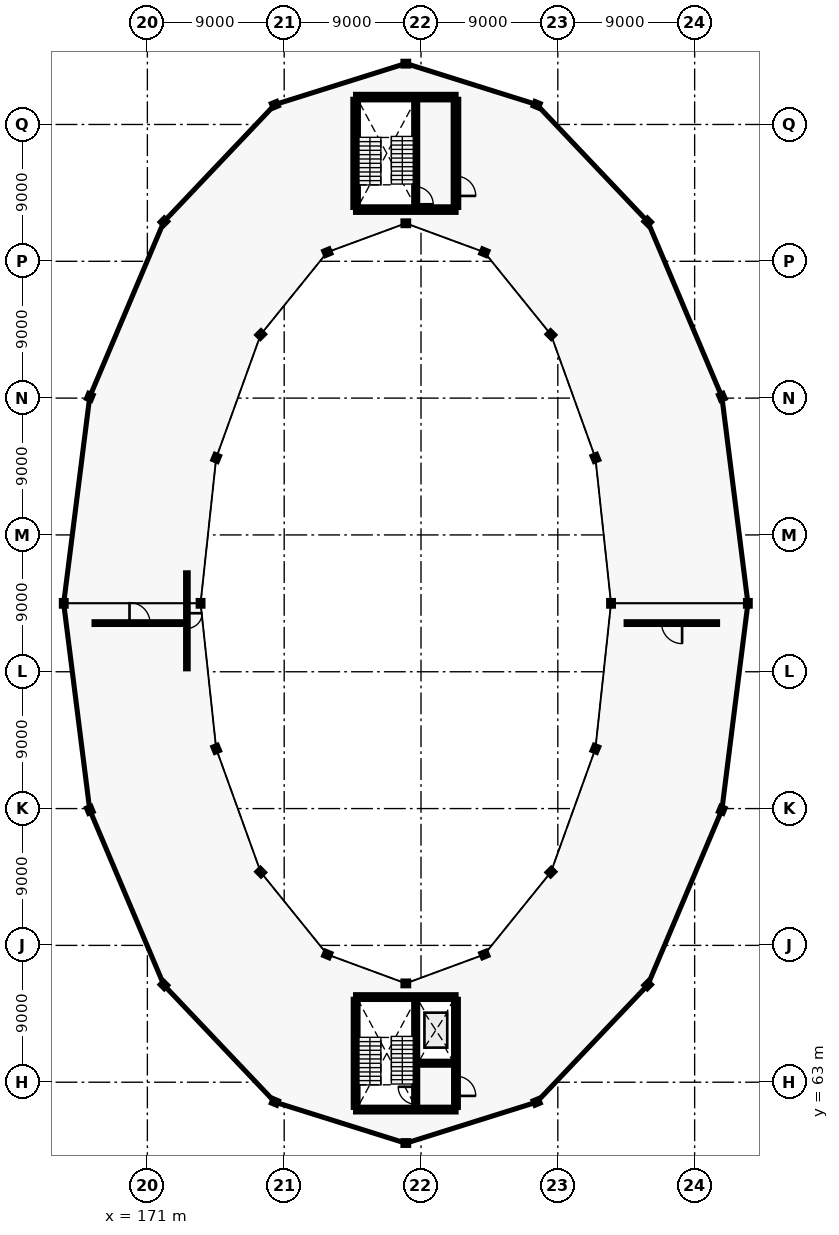
"""IFC4 building model, lengths in metres.
Left out: names, types, materials, properties, quantities, classifications, styles, units other than length and angle.
Written with IfcOpenShell. Run it as: python <this file> out.ifc"""

import sys

from ifc_helpers import new_model, si_unit, direction, frame, frame_2d, origin, origin_2d, place, context, subcontext, project, spatial, rectangle, i_section, extrude, element, fill, save


model = new_model("IFC4")
c1 = context("Model", 3, precision=1e-05, world=origin(), true_north=direction((0.0, 1.0)))
c2 = subcontext(c1, "Body", "Model", "MODEL_VIEW")
j1 = project(units=[si_unit("LENGTHUNIT", "METRE"), si_unit("PLANEANGLEUNIT", "RADIAN")], contexts=[c1])
p1 = place(None, origin())
s1 = spatial("IfcSite", under=j1, at=p1, CompositionType="ELEMENT")
p2 = place(p1, origin())
s2 = spatial("IfcBuilding", under=s1, at=p2, CompositionType="ELEMENT")
p3 = place(p2, frame((0.0, 0.0, 5.4)))
s3 = spatial("IfcBuildingStorey", under=s2, at=p3, CompositionType="ELEMENT", Elevation=5.4)
for number, where, z_axis, x_axis in (
    (1, (201.5, 94.5, 0.0), (0.0, 0.0, 1.0), (1.0, 0.0, 0.0)),
    (2, (210.5, 94.5, 0.0), (0.0, 0.0, 1.0), (1.0, 0.0, 0.0)),
    (3, (200.472, 104.067, 0.0), (0.0, 0.0, 1.0), (0.924, 0.383, 0.0)),
    (4, (208.787, 108.085, 0.0), (0.0, 0.0, 1.0), (0.924, 0.383, 0.0)),
    (5, (197.546, 112.178, 0.0), (0.0, 0.0, 1.0), (0.707, 0.707, 0.0)),
    (6, (203.91, 119.602, 0.0), (0.0, 0.0, 1.0), (0.707, 0.707, 0.0)),
    (7, (193.166, 117.597, 0.0), (0.0, 0.0, 1.0), (0.383, 0.924, 0.0)),
    (8, (196.61, 127.298, 0.0), (0.0, 0.0, 1.0), (0.383, 0.924, 0.0)),
    (9, (188.0, 119.5, 0.0), (0.0, 0.0, 1.0), (0.0, 1.0, 0.0)),
    (10, (188.0, 130.0, 0.0), (0.0, 0.0, 1.0), (0.0, 1.0, 0.0)),
    (11, (182.834, 117.597, 0.0), (0.0, 0.0, 1.0), (-0.383, 0.924, 0.0)),
    (12, (179.39, 127.298, 0.0), (0.0, 0.0, 1.0), (-0.383, 0.924, 0.0)),
    (13, (178.454, 112.178, 0.0), (0.0, 0.0, 1.0), (-0.707, 0.707, 0.0)),
    (14, (172.09, 119.602, 0.0), (0.0, 0.0, 1.0), (-0.707, 0.707, 0.0)),
    (15, (175.528, 104.067, 0.0), (0.0, 0.0, 1.0), (-0.924, 0.383, 0.0)),
    (16, (167.213, 108.085, 0.0), (0.0, 0.0, 1.0), (-0.924, 0.383, 0.0)),
    (17, (174.5, 94.5, 0.0), (0.0, 0.0, 1.0), (-1.0, 0.0, 0.0)),
    (18, (165.5, 94.5, 0.0), (0.0, 0.0, 1.0), (-1.0, 0.0, 0.0)),
    (19, (175.528, 84.933, 0.0), (0.0, 0.0, 1.0), (-0.924, -0.383, 0.0)),
    (20, (167.213, 80.915, 0.0), (0.0, 0.0, 1.0), (-0.924, -0.383, 0.0)),
    (21, (178.454, 76.822, 0.0), (0.0, 0.0, 1.0), (-0.707, -0.707, 0.0)),
    (22, (172.09, 69.398, 0.0), (0.0, 0.0, 1.0), (-0.707, -0.707, 0.0)),
    (23, (182.834, 71.403, 0.0), (0.0, 0.0, 1.0), (-0.383, -0.924, 0.0)),
    (24, (179.39, 61.702, 0.0), (0.0, 0.0, 1.0), (-0.383, -0.924, 0.0)),
    (25, (188.0, 69.5, 0.0), (0.0, 0.0, 1.0), (0.0, -1.0, 0.0)),
    (26, (188.0, 59.0, 0.0), (0.0, 0.0, 1.0), (0.0, -1.0, 0.0)),
    (27, (193.166, 71.403, 0.0), (0.0, 0.0, 1.0), (0.383, -0.924, 0.0)),
    (28, (196.61, 61.702, 0.0), (0.0, 0.0, 1.0), (0.383, -0.924, 0.0)),
    (29, (197.546, 76.822, 0.0), (0.0, 0.0, 1.0), (0.707, -0.707, 0.0)),
    (30, (203.91, 69.398, 0.0), (0.0, 0.0, 1.0), (0.707, -0.707, 0.0)),
    (31, (200.472, 84.933, 0.0), (0.0, 0.0, 1.0), (0.924, -0.383, 0.0)),
    (32, (208.787, 80.915, 0.0), (0.0, 0.0, 1.0), (0.924, -0.383, 0.0)),
):
    element("IfcColumn", number, at=place(p3, frame(where, z_axis=z_axis, x_axis=x_axis)), inside=s3, PredefinedType="COLUMN", context=c2, shape_type="SweptSolid", body=[
        extrude(i_section(OverallWidth=0.3, OverallDepth=0.36, WebThickness=0.012, FlangeThickness=0.022, FilletRadius=0.027, at=origin_2d()), origin(), (0.0, 0.0, 1.0), 4.2),
    ])
for number, where, z_axis, x_axis in (
    (33, (184.7, 61.2, 0.0), (0.0, 0.0, 1.0), (1.0, 0.0, 0.0)),
    (34, (184.7, 68.6, 0.0), (0.0, 0.0, 1.0), (1.0, 0.0, 0.0)),
):
    element("IfcWall", number, at=place(p3, frame(where, z_axis=z_axis, x_axis=x_axis)), inside=s3, PredefinedType="SHEAR", context=c2, shape_type="SweptSolid", body=[
        extrude(rectangle(XDim=6.6, YDim=0.3, at=frame_2d((3.3, 0.0))), origin(), (0.0, 0.0, 1.0), 4.2),
    ])
p4 = place(p3, frame((184.7, 61.35, 0.0), z_axis=(0.0, 0.0, 1.0), x_axis=(0.0, 1.0, 0.0)))
e35 = element("IfcWall", 35, at=p4, inside=s3, PredefinedType="SHEAR", context=c2, shape_type="SweptSolid", body=[
    extrude(rectangle(XDim=7.1, YDim=0.3, at=frame_2d((3.55, 0.0))), origin(), (0.0, 0.0, 1.0), 4.2),
])
p5 = place(p3, frame((191.3, 61.35, 0.0), z_axis=(0.0, 0.0, 1.0), x_axis=(0.0, 1.0, 0.0)))
e36 = element("IfcWall", 36, at=p5, inside=s3, PredefinedType="SHEAR", context=c2, shape_type="SweptSolid", body=[
    extrude(rectangle(XDim=7.1, YDim=0.3, at=frame_2d((3.55, 0.0))), origin(), (0.0, 0.0, 1.0), 4.2),
])
p6 = place(p5, frame((0.75, 0.0, 0.0)))
e37 = element("IfcOpeningElement", 37, at=p6, cuts=e36, PredefinedType="OPENING", context=c2, shape_type="SweptSolid", body=[
    extrude(rectangle(XDim=1.3, YDim=2.15, at=frame_2d((0.65, 1.075))), frame((0.0, 0.16, 0.0), z_axis=(0.0, -1.0, 0.0), x_axis=(1.0, 0.0, 0.0)), (0.0, 0.0, 1.0), 0.32),
])
p7 = place(p3, frame((188.65, 61.35, 0.0), z_axis=(0.0, 0.0, 1.0), x_axis=(0.0, 1.0, 0.0)))
e38 = element("IfcWall", 38, at=p7, inside=s3, PredefinedType="SHEAR", context=c2, shape_type="SweptSolid", body=[
    extrude(rectangle(XDim=7.1, YDim=0.25, at=frame_2d((3.55, 0.0))), origin(), (0.0, 0.0, 1.0), 4.2),
])
p8 = place(p7, frame((0.2, 0.0, 0.0)))
e39 = element("IfcOpeningElement", 39, at=p8, cuts=e38, PredefinedType="OPENING", context=c2, shape_type="SweptSolid", body=[
    extrude(rectangle(XDim=1.15, YDim=2.15, at=frame_2d((0.575, 1.075))), frame((0.0, 0.135, 0.0), z_axis=(0.0, -1.0, 0.0), x_axis=(1.0, 0.0, 0.0)), (0.0, 0.0, 1.0), 0.27),
])
p9 = place(p3, frame((188.77, 64.25, 0.0), z_axis=(0.0, 0.0, 1.0), x_axis=(1.0, 0.0, 0.0)))
e40 = element("IfcWall", 40, at=p9, inside=s3, PredefinedType="SHEAR", context=c2, shape_type="SweptSolid", body=[
    extrude(rectangle(XDim=2.38, YDim=0.25, at=frame_2d((1.19, 0.0))), origin(), (0.0, 0.0, 1.0), 4.2),
])
p10 = place(p9, frame((0.64, 0.0, 0.0)))
e41 = element("IfcOpeningElement", 41, at=p10, cuts=e40, PredefinedType="OPENING", context=c2, shape_type="SweptSolid", body=[
    extrude(rectangle(XDim=1.1, YDim=2.15, at=frame_2d((0.55, 1.075))), frame((0.0, 0.135, 0.0), z_axis=(0.0, -1.0, 0.0), x_axis=(1.0, 0.0, 0.0)), (0.0, 0.0, 1.0), 0.27),
])
for number, where, z_axis, x_axis in (
    (42, (184.7, 120.4, 0.0), (0.0, 0.0, 1.0), (1.0, 0.0, 0.0)),
    (43, (184.7, 127.8, 0.0), (0.0, 0.0, 1.0), (1.0, 0.0, 0.0)),
):
    element("IfcWall", number, at=place(p3, frame(where, z_axis=z_axis, x_axis=x_axis)), inside=s3, PredefinedType="SHEAR", context=c2, shape_type="SweptSolid", body=[
        extrude(rectangle(XDim=6.6, YDim=0.35, at=frame_2d((3.3, 0.0))), origin(), (0.0, 0.0, 1.0), 4.2),
    ])
p11 = place(p3, frame((184.7, 120.55, 0.0), z_axis=(0.0, 0.0, 1.0), x_axis=(0.0, 1.0, 0.0)))
e44 = element("IfcWall", 44, at=p11, inside=s3, PredefinedType="SHEAR", context=c2, shape_type="SweptSolid", body=[
    extrude(rectangle(XDim=7.1, YDim=0.35, at=frame_2d((3.55, 0.0))), origin(), (0.0, 0.0, 1.0), 4.2),
])
p12 = place(p3, frame((191.3, 120.55, 0.0), z_axis=(0.0, 0.0, 1.0), x_axis=(0.0, 1.0, 0.0)))
e45 = element("IfcWall", 45, at=p12, inside=s3, PredefinedType="SHEAR", context=c2, shape_type="SweptSolid", body=[
    extrude(rectangle(XDim=7.1, YDim=0.35, at=frame_2d((3.55, 0.0))), origin(), (0.0, 0.0, 1.0), 4.2),
])
p13 = place(p12, frame((0.75, 0.0, 0.0)))
e46 = element("IfcOpeningElement", 46, at=p13, cuts=e45, PredefinedType="OPENING", context=c2, shape_type="SweptSolid", body=[
    extrude(rectangle(XDim=1.3, YDim=2.15, at=frame_2d((0.65, 1.075))), frame((0.0, 0.185, 0.0), z_axis=(0.0, -1.0, 0.0), x_axis=(1.0, 0.0, 0.0)), (0.0, 0.0, 1.0), 0.37),
])
p14 = place(p3, frame((188.65, 120.55, 0.0), z_axis=(0.0, 0.0, 1.0), x_axis=(0.0, 1.0, 0.0)))
e47 = element("IfcWall", 47, at=p14, inside=s3, PredefinedType="SHEAR", context=c2, shape_type="SweptSolid", body=[
    extrude(rectangle(XDim=7.1, YDim=0.25, at=frame_2d((3.55, 0.0))), origin(), (0.0, 0.0, 1.0), 4.2),
])
p15 = place(p14, frame((0.2, 0.0, 0.0)))
e48 = element("IfcOpeningElement", 48, at=p15, cuts=e47, PredefinedType="OPENING", context=c2, shape_type="SweptSolid", body=[
    extrude(rectangle(XDim=1.15, YDim=2.15, at=frame_2d((0.575, 1.075))), frame((0.0, 0.135, 0.0), z_axis=(0.0, -1.0, 0.0), x_axis=(1.0, 0.0, 0.0)), (0.0, 0.0, 1.0), 0.27),
])
p16 = place(p3, frame((173.6, 90.2, 0.0), z_axis=(0.0, 0.0, 1.0), x_axis=(0.0, 1.0, 0.0)))
e49 = element("IfcWall", 49, at=p16, inside=s3, PredefinedType="PARTITIONING", context=c2, shape_type="SweptSolid", body=[
    extrude(rectangle(XDim=6.3, YDim=0.155, at=frame_2d((3.15, 0.0))), origin(), (0.0, 0.0, 1.0), 3.2),
])
p17 = place(p16, frame((2.65, 0.0, 0.0)))
e50 = element("IfcOpeningElement", 50, at=p17, cuts=e49, PredefinedType="OPENING", context=c2, shape_type="SweptSolid", body=[
    extrude(rectangle(XDim=1.0, YDim=2.1, at=frame_2d((0.5, 1.05))), frame((0.0, 0.087, 0.0), z_axis=(0.0, -1.0, 0.0), x_axis=(1.0, 0.0, 0.0)), (0.0, 0.0, 1.0), 0.175),
])
p18 = place(p3, frame((167.5, 93.2, 0.0), z_axis=(0.0, 0.0, 1.0), x_axis=(1.0, 0.0, 0.0)))
e51 = element("IfcWall", 51, at=p18, inside=s3, PredefinedType="PARTITIONING", context=c2, shape_type="SweptSolid", body=[
    extrude(rectangle(XDim=6.0, YDim=0.165, at=frame_2d((3.0, 0.0))), origin(), (0.0, 0.0, 1.0), 3.2),
])
p19 = place(p18, frame((2.325, 0.0, 0.0)))
e52 = element("IfcOpeningElement", 52, at=p19, cuts=e51, PredefinedType="OPENING", context=c2, shape_type="SweptSolid", body=[
    extrude(rectangle(XDim=1.35, YDim=2.2, at=frame_2d((0.675, 1.1))), frame((0.0, 0.093, 0.0), z_axis=(0.0, -1.0, 0.0), x_axis=(1.0, 0.0, 0.0)), (0.0, 0.0, 1.0), 0.185),
])
p20 = place(p3, frame((202.5, 93.2, 0.0), z_axis=(0.0, 0.0, 1.0), x_axis=(1.0, 0.0, 0.0)))
e53 = element("IfcWall", 53, at=p20, inside=s3, PredefinedType="PARTITIONING", context=c2, shape_type="SweptSolid", body=[
    extrude(rectangle(XDim=6.0, YDim=0.165, at=frame_2d((3.0, 0.0))), origin(), (0.0, 0.0, 1.0), 3.2),
])
p21 = place(p20, frame((2.325, 0.0, 0.0)))
e54 = element("IfcOpeningElement", 54, at=p21, cuts=e53, PredefinedType="OPENING", context=c2, shape_type="SweptSolid", body=[
    extrude(rectangle(XDim=1.35, YDim=2.2, at=frame_2d((0.675, 1.1))), frame((0.0, 0.093, 0.0), z_axis=(0.0, -1.0, 0.0), x_axis=(1.0, 0.0, 0.0)), (0.0, 0.0, 1.0), 0.185),
])
p22 = place(p6, frame((1.3, 0.0, 0.0), z_axis=(0.0, 0.0, 1.0), x_axis=(-1.0, 0.0, 0.0)))
e55 = element("IfcDoor", 55, at=p22, inside=s3, OperationType="DOUBLE_DOOR_SINGLE_SWING", PredefinedType="DOOR", context=c2, shape_type="SweptSolid", body=[
    extrude(rectangle(XDim=1.3, YDim=2.15, at=frame_2d((0.65, 1.075))), frame((0.0, 0.025, 0.0), z_axis=(0.0, -1.0, 0.0), x_axis=(1.0, 0.0, 0.0)), (0.0, 0.0, 1.0), 0.05),
])
fill(e37, e55)
p23 = place(p8, frame((1.15, 0.0, 0.0), z_axis=(0.0, 0.0, 1.0), x_axis=(-1.0, 0.0, 0.0)))
e56 = element("IfcDoor", 56, at=p23, inside=s3, OperationType="SINGLE_SWING_RIGHT", PredefinedType="DOOR", context=c2, shape_type="SweptSolid", body=[
    extrude(rectangle(XDim=1.15, YDim=2.15, at=frame_2d((0.575, 1.075))), frame((0.0, 0.025, 0.0), z_axis=(0.0, -1.0, 0.0), x_axis=(1.0, 0.0, 0.0)), (0.0, 0.0, 1.0), 0.05),
])
fill(e39, e56)
p24 = place(p10, origin())
e57 = element("IfcDoor", 57, at=p24, inside=s3, OperationType="SLIDING_TO_LEFT", PredefinedType="DOOR", context=c2, shape_type="SweptSolid", body=[
    extrude(rectangle(XDim=1.1, YDim=2.15, at=frame_2d((0.55, 1.075))), frame((0.0, 0.025, 0.0), z_axis=(0.0, -1.0, 0.0), x_axis=(1.0, 0.0, 0.0)), (0.0, 0.0, 1.0), 0.05),
])
fill(e41, e57)
p25 = place(p13, frame((1.3, 0.0, 0.0), z_axis=(0.0, 0.0, 1.0), x_axis=(-1.0, 0.0, 0.0)))
e58 = element("IfcDoor", 58, at=p25, inside=s3, OperationType="DOUBLE_DOOR_SINGLE_SWING", PredefinedType="DOOR", context=c2, shape_type="SweptSolid", body=[
    extrude(rectangle(XDim=1.3, YDim=2.15, at=frame_2d((0.65, 1.075))), frame((0.0, 0.025, 0.0), z_axis=(0.0, -1.0, 0.0), x_axis=(1.0, 0.0, 0.0)), (0.0, 0.0, 1.0), 0.05),
])
fill(e46, e58)
p26 = place(p15, frame((1.15, 0.0, 0.0), z_axis=(0.0, 0.0, 1.0), x_axis=(-1.0, 0.0, 0.0)))
e59 = element("IfcDoor", 59, at=p26, inside=s3, OperationType="SINGLE_SWING_LEFT", PredefinedType="DOOR", context=c2, shape_type="SweptSolid", body=[
    extrude(rectangle(XDim=1.15, YDim=2.15, at=frame_2d((0.575, 1.075))), frame((0.0, 0.025, 0.0), z_axis=(0.0, -1.0, 0.0), x_axis=(1.0, 0.0, 0.0)), (0.0, 0.0, 1.0), 0.05),
])
fill(e48, e59)
p27 = place(p17, origin())
e60 = element("IfcDoor", 60, at=p27, inside=s3, OperationType="SINGLE_SWING_RIGHT", PredefinedType="DOOR", context=c2, shape_type="SweptSolid", body=[
    extrude(rectangle(XDim=1.0, YDim=2.1, at=frame_2d((0.5, 1.05))), frame((0.0, 0.025, 0.0), z_axis=(0.0, -1.0, 0.0), x_axis=(1.0, 0.0, 0.0)), (0.0, 0.0, 1.0), 0.05),
])
fill(e50, e60)
p28 = place(p19, origin())
e61 = element("IfcDoor", 61, at=p28, inside=s3, OperationType="SINGLE_SWING_LEFT", PredefinedType="DOOR", context=c2, shape_type="SweptSolid", body=[
    extrude(rectangle(XDim=1.35, YDim=2.2, at=frame_2d((0.675, 1.1))), frame((0.0, 0.025, 0.0), z_axis=(0.0, -1.0, 0.0), x_axis=(1.0, 0.0, 0.0)), (0.0, 0.0, 1.0), 0.05),
])
fill(e52, e61)
p29 = place(p21, origin())
e62 = element("IfcDoor", 62, at=p29, inside=s3, OperationType="SINGLE_SWING_RIGHT", PredefinedType="DOOR", context=c2, shape_type="SweptSolid", body=[
    extrude(rectangle(XDim=1.35, YDim=2.2, at=frame_2d((0.675, 1.1))), frame((0.0, 0.025, 0.0), z_axis=(0.0, -1.0, 0.0), x_axis=(1.0, 0.0, 0.0)), (0.0, 0.0, 1.0), 0.05),
])
fill(e54, e62)
save(model, sys.argv[1])
